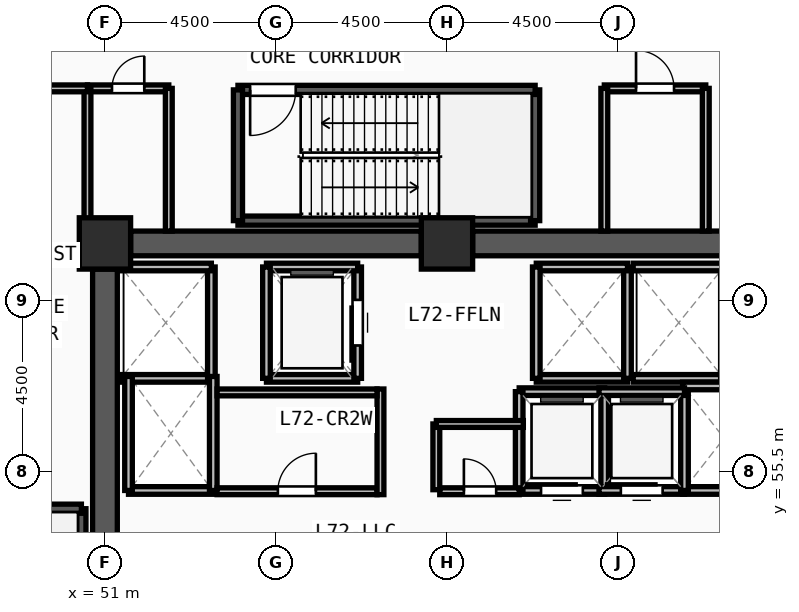
"""IFC4 building model, lengths in metres.
Left out: names, types, materials, properties, quantities, classifications, styles, units other than length and angle.
Written with IfcOpenShell. Run it as: python <this file> out.ifc"""

import sys

from ifc_helpers import new_model, si_unit, direction, frame, frame_2d, origin, origin_2d, place, context, subcontext, project, spatial, rectangle, extrude, source, transform, mapped, element, fill, save


model = new_model("IFC4")
c1 = context("Model", 3, precision=1e-05, world=origin(), true_north=direction((0.0, 1.0)))
c2 = subcontext(c1, "Body", "Model", "MODEL_VIEW")
j1 = project(units=[si_unit("LENGTHUNIT", "METRE"), si_unit("PLANEANGLEUNIT", "RADIAN")], contexts=[c1])
p1 = place(None, origin())
s1 = spatial("IfcSite", under=j1, at=p1, CompositionType="ELEMENT")
p2 = place(p1, origin())
s2 = spatial("IfcBuilding", under=s1, at=p2, CompositionType="ELEMENT")
p3 = place(p2, frame((0.0, 0.0, 277.5)))
s3 = spatial("IfcBuildingStorey", under=s2, at=p3, CompositionType="ELEMENT", Elevation=277.5)
m1 = source(origin(), c2, "Body", "SweptSolid", [
    extrude(rectangle(XDim=1.35, YDim=1.35, at=origin_2d()), origin(), (0.0, 0.0, 1.0), 4.5),
])
for number, where, z_axis, x_axis in (
    (1, (60.0, 61.5, 0.0), (0.0, 0.0, 1.0), (1.0, 0.0, 0.0)),
    (2, (51.0, 61.5, 0.0), (0.0, 0.0, 1.0), (1.0, 0.0, 0.0)),
):
    element("IfcColumn", number, at=place(p3, frame(where, z_axis=z_axis, x_axis=x_axis)), inside=s3, PredefinedType="COLUMN", context=c2, shape_type="MappedRepresentation", body=[
        mapped(m1, transform((0.0, 0.0, 0.0), x_axis=(1.0, 0.0, 0.0), y_axis=(0.0, 1.0, 0.0), z_axis=(0.0, 0.0, 1.0), scale=1.0)),
    ])
for number, where, z_axis, x_axis in (
    (3, (51.675, 61.5, 0.0), (0.0, 0.0, 1.0), (1.0, 0.0, 0.0)),
    (4, (60.675, 61.5, 0.0), (0.0, 0.0, 1.0), (1.0, 0.0, 0.0)),
):
    element("IfcWall", number, at=place(p3, frame(where, z_axis=z_axis, x_axis=x_axis)), inside=s3, PredefinedType="SHEAR", context=c2, shape_type="SweptSolid", body=[
        extrude(rectangle(XDim=7.65, YDim=0.65, at=frame_2d((3.825, 0.0))), origin(), (0.0, 0.0, 1.0), 4.22),
    ])
p4 = place(p3, frame((51.0, 47.175, 0.0), z_axis=(0.0, 0.0, 1.0), x_axis=(0.0, 1.0, 0.0)))
e5 = element("IfcWall", 5, at=p4, inside=s3, PredefinedType="SHEAR", context=c2, shape_type="SweptSolid", body=[
    extrude(rectangle(XDim=13.65, YDim=0.65, at=frame_2d((6.825, 0.0))), origin(), (0.0, 0.0, 1.0), 4.22),
])
p5 = place(p3, frame((50.38, 46.7, 0.0), z_axis=(0.0, 0.0, 1.0), x_axis=(0.0, 1.0, 0.0)))
e6 = element("IfcWall", 6, at=p5, inside=s3, PredefinedType="SOLIDWALL", context=c2, shape_type="SweptSolid", body=[
    extrude(rectangle(XDim=7.82, YDim=0.24, at=frame_2d((3.91, 0.0))), origin(), (0.0, 0.0, 1.0), 4.22),
])
p6 = place(p3, frame((50.38, 54.52, 0.0), z_axis=(0.0, 0.0, 1.0), x_axis=(-1.0, 0.0, 0.0)))
e7 = element("IfcWall", 7, at=p6, inside=s3, PredefinedType="SOLIDWALL", context=c2, shape_type="SweptSolid", body=[
    extrude(rectangle(XDim=3.44, YDim=0.24, at=frame_2d((1.72, 0.0))), origin(), (0.0, 0.0, 1.0), 4.22),
])
p7 = place(p3, frame((54.5, 62.1, 0.0), z_axis=(0.0, 0.0, 1.0), x_axis=(1.0, 0.0, 0.0)))
e8 = element("IfcWall", 8, at=p7, inside=s3, PredefinedType="SOLIDWALL", context=c2, shape_type="SweptSolid", body=[
    extrude(rectangle(XDim=7.82, YDim=0.24, at=frame_2d((3.91, 0.0))), origin(), (0.0, 0.0, 1.0), 4.22),
])
p8 = place(p3, frame((62.32, 62.1, 0.0), z_axis=(0.0, 0.0, 1.0), x_axis=(0.0, 1.0, 0.0)))
e9 = element("IfcWall", 9, at=p8, inside=s3, PredefinedType="SOLIDWALL", context=c2, shape_type="SweptSolid", body=[
    extrude(rectangle(XDim=3.44, YDim=0.24, at=frame_2d((1.72, 0.0))), origin(), (0.0, 0.0, 1.0), 4.22),
])
p9 = place(p3, frame((62.32, 65.54, 0.0), z_axis=(0.0, 0.0, 1.0), x_axis=(-1.0, 0.0, 0.0)))
e10 = element("IfcWall", 10, at=p9, inside=s3, PredefinedType="SOLIDWALL", context=c2, shape_type="SweptSolid", body=[
    extrude(rectangle(XDim=7.82, YDim=0.24, at=frame_2d((3.91, 0.0))), origin(), (0.0, 0.0, 1.0), 4.22),
])
m2 = source(origin(), c2, "Body", "SweptSolid", [
    extrude(rectangle(XDim=1.2, YDim=2.2, at=frame_2d((0.6, 1.1))), frame((0.0, 0.13, 0.0), z_axis=(0.0, -1.0, 0.0), x_axis=(1.0, 0.0, 0.0)), (0.0, 0.0, 1.0), 0.26),
])
p10 = place(p9, frame((6.3, 0.0, 0.0)))
e11 = element("IfcOpeningElement", 11, at=p10, cuts=e10, PredefinedType="OPENING", context=c2, shape_type="MappedRepresentation", body=[
    mapped(m2, transform((0.0, 0.0, 0.0), x_axis=(1.0, 0.0, 0.0), y_axis=(0.0, 1.0, 0.0), z_axis=(0.0, 0.0, 1.0), scale=1.0)),
])
p11 = place(p3, frame((54.5, 65.54, 0.0), z_axis=(0.0, 0.0, 1.0), x_axis=(0.0, -1.0, 0.0)))
e12 = element("IfcWall", 12, at=p11, inside=s3, PredefinedType="SOLIDWALL", context=c2, shape_type="SweptSolid", body=[
    extrude(rectangle(XDim=3.44, YDim=0.24, at=frame_2d((1.72, 0.0))), origin(), (0.0, 0.0, 1.0), 4.22),
])
p12 = place(p3, frame((55.25, 57.95, 0.0), z_axis=(0.0, 0.0, 1.0), x_axis=(1.0, 0.0, 0.0)))
e13 = element("IfcWall", 13, at=p12, inside=s3, PredefinedType="SOLIDWALL", context=c2, shape_type="SweptSolid", body=[
    extrude(rectangle(XDim=2.4, YDim=0.2, at=frame_2d((1.2, 0.0))), origin(), (0.0, 0.0, 1.0), 4.22),
])
p13 = place(p3, frame((57.65, 57.95, 0.0), z_axis=(0.0, 0.0, 1.0), x_axis=(0.0, 1.0, 0.0)))
e14 = element("IfcWall", 14, at=p13, inside=s3, PredefinedType="SOLIDWALL", context=c2, shape_type="SweptSolid", body=[
    extrude(rectangle(XDim=2.93, YDim=0.2, at=frame_2d((1.465, 0.0))), origin(), (0.0, 0.0, 1.0), 4.22),
])
m3 = source(origin(), c2, "Body", "SweptSolid", [
    extrude(rectangle(XDim=1.2, YDim=2.3, at=frame_2d((0.6, 1.15))), frame((0.0, 0.11, 0.0), z_axis=(0.0, -1.0, 0.0), x_axis=(1.0, 0.0, 0.0)), (0.0, 0.0, 1.0), 0.22),
])
p14 = place(p13, frame((0.865, 0.0, 0.0)))
e15 = element("IfcOpeningElement", 15, at=p14, cuts=e14, PredefinedType="OPENING", context=c2, shape_type="MappedRepresentation", body=[
    mapped(m3, transform((0.0, 0.0, 0.0), x_axis=(1.0, 0.0, 0.0), y_axis=(0.0, 1.0, 0.0), z_axis=(0.0, 0.0, 1.0), scale=1.0)),
])
p15 = place(p3, frame((57.65, 60.88, 0.0), z_axis=(0.0, 0.0, 1.0), x_axis=(-1.0, 0.0, 0.0)))
e16 = element("IfcWall", 16, at=p15, inside=s3, PredefinedType="SOLIDWALL", context=c2, shape_type="SweptSolid", body=[
    extrude(rectangle(XDim=2.4, YDim=0.2, at=frame_2d((1.2, 0.0))), origin(), (0.0, 0.0, 1.0), 4.22),
])
p16 = place(p3, frame((55.25, 60.88, 0.0), z_axis=(0.0, 0.0, 1.0), x_axis=(0.0, -1.0, 0.0)))
e17 = element("IfcWall", 17, at=p16, inside=s3, PredefinedType="SOLIDWALL", context=c2, shape_type="SweptSolid", body=[
    extrude(rectangle(XDim=2.93, YDim=0.2, at=frame_2d((1.465, 0.0))), origin(), (0.0, 0.0, 1.0), 4.22),
])
p17 = place(p3, frame((62.35, 57.95, 0.0), z_axis=(0.0, 0.0, 1.0), x_axis=(1.0, 0.0, 0.0)))
e18 = element("IfcWall", 18, at=p17, inside=s3, PredefinedType="SOLIDWALL", context=c2, shape_type="SweptSolid", body=[
    extrude(rectangle(XDim=2.4, YDim=0.2, at=frame_2d((1.2, 0.0))), origin(), (0.0, 0.0, 1.0), 4.22),
])
p18 = place(p3, frame((64.75, 57.95, 0.0), z_axis=(0.0, 0.0, 1.0), x_axis=(0.0, 1.0, 0.0)))
e19 = element("IfcWall", 19, at=p18, inside=s3, PredefinedType="SOLIDWALL", context=c2, shape_type="SweptSolid", body=[
    extrude(rectangle(XDim=2.93, YDim=0.2, at=frame_2d((1.465, 0.0))), origin(), (0.0, 0.0, 1.0), 4.22),
])
p19 = place(p3, frame((64.75, 60.88, 0.0), z_axis=(0.0, 0.0, 1.0), x_axis=(-1.0, 0.0, 0.0)))
e20 = element("IfcWall", 20, at=p19, inside=s3, PredefinedType="SOLIDWALL", context=c2, shape_type="SweptSolid", body=[
    extrude(rectangle(XDim=2.4, YDim=0.2, at=frame_2d((1.2, 0.0))), origin(), (0.0, 0.0, 1.0), 4.22),
])
p20 = place(p3, frame((62.35, 60.88, 0.0), z_axis=(0.0, 0.0, 1.0), x_axis=(0.0, -1.0, 0.0)))
e21 = element("IfcWall", 21, at=p20, inside=s3, PredefinedType="SOLIDWALL", context=c2, shape_type="SweptSolid", body=[
    extrude(rectangle(XDim=2.93, YDim=0.2, at=frame_2d((1.465, 0.0))), origin(), (0.0, 0.0, 1.0), 4.22),
])
for number, where, z_axis, x_axis in (
    (22, (64.9, 57.95, 0.0), (0.0, 0.0, 1.0), (1.0, 0.0, 0.0)),
    (23, (67.3, 60.88, 0.0), (0.0, 0.0, 1.0), (-1.0, 0.0, 0.0)),
    (24, (51.4, 57.95, 0.0), (0.0, 0.0, 1.0), (1.0, 0.0, 0.0)),
):
    element("IfcWall", number, at=place(p3, frame(where, z_axis=z_axis, x_axis=x_axis)), inside=s3, PredefinedType="SOLIDWALL", context=c2, shape_type="SweptSolid", body=[
        extrude(rectangle(XDim=2.4, YDim=0.2, at=frame_2d((1.2, 0.0))), origin(), (0.0, 0.0, 1.0), 4.22),
    ])
p21 = place(p3, frame((53.8, 57.95, 0.0), z_axis=(0.0, 0.0, 1.0), x_axis=(0.0, 1.0, 0.0)))
e25 = element("IfcWall", 25, at=p21, inside=s3, PredefinedType="SOLIDWALL", context=c2, shape_type="SweptSolid", body=[
    extrude(rectangle(XDim=2.93, YDim=0.2, at=frame_2d((1.465, 0.0))), origin(), (0.0, 0.0, 1.0), 4.22),
])
p22 = place(p3, frame((53.8, 60.88, 0.0), z_axis=(0.0, 0.0, 1.0), x_axis=(-1.0, 0.0, 0.0)))
e26 = element("IfcWall", 26, at=p22, inside=s3, PredefinedType="SOLIDWALL", context=c2, shape_type="SweptSolid", body=[
    extrude(rectangle(XDim=2.4, YDim=0.2, at=frame_2d((1.2, 0.0))), origin(), (0.0, 0.0, 1.0), 4.22),
])
p23 = place(p3, frame((51.62, 55.0, 0.0), z_axis=(0.0, 0.0, 1.0), x_axis=(1.0, 0.0, 0.0)))
e27 = element("IfcWall", 27, at=p23, inside=s3, PredefinedType="SOLIDWALL", context=c2, shape_type="SweptSolid", body=[
    extrude(rectangle(XDim=2.23, YDim=0.2, at=frame_2d((1.115, 0.0))), origin(), (0.0, 0.0, 1.0), 4.22),
])
for number, where, z_axis, x_axis in (
    (28, (53.85, 55.0, 0.0), (0.0, 0.0, 1.0), (0.0, 1.0, 0.0)),
    (29, (51.62, 58.0, 0.0), (0.0, 0.0, 1.0), (0.0, -1.0, 0.0)),
):
    element("IfcWall", number, at=place(p3, frame(where, z_axis=z_axis, x_axis=x_axis)), inside=s3, PredefinedType="SOLIDWALL", context=c2, shape_type="SweptSolid", body=[
        extrude(rectangle(XDim=3.0, YDim=0.2, at=frame_2d((1.5, 0.0))), origin(), (0.0, 0.0, 1.0), 4.22),
    ])
for number, where, z_axis, x_axis in (
    (30, (66.2, 55.0, 0.0), (0.0, 0.0, 1.0), (1.0, 0.0, 0.0)),
    (31, (68.38, 57.75, 0.0), (0.0, 0.0, 1.0), (-1.0, 0.0, 0.0)),
):
    element("IfcWall", number, at=place(p3, frame(where, z_axis=z_axis, x_axis=x_axis)), inside=s3, PredefinedType="SOLIDWALL", context=c2, shape_type="SweptSolid", body=[
        extrude(rectangle(XDim=2.18, YDim=0.2, at=frame_2d((1.09, 0.0))), origin(), (0.0, 0.0, 1.0), 4.22),
    ])
p24 = place(p3, frame((61.9, 55.0, 0.0), z_axis=(0.0, 0.0, 1.0), x_axis=(1.0, 0.0, 0.0)))
e32 = element("IfcWall", 32, at=p24, inside=s3, PredefinedType="SOLIDWALL", context=c2, shape_type="SweptSolid", body=[
    extrude(rectangle(XDim=2.25, YDim=0.2, at=frame_2d((1.125, 0.0))), origin(), (0.0, 0.0, 1.0), 4.22),
])
m4 = source(origin(), c2, "Body", "SweptSolid", [
    extrude(rectangle(XDim=1.1, YDim=2.2, at=frame_2d((0.55, 1.1))), frame((0.0, 0.11, 0.0), z_axis=(0.0, -1.0, 0.0), x_axis=(1.0, 0.0, 0.0)), (0.0, 0.0, 1.0), 0.22),
])
p25 = place(p24, frame((0.575, 0.0, 0.0)))
e33 = element("IfcOpeningElement", 33, at=p25, cuts=e32, PredefinedType="OPENING", context=c2, shape_type="MappedRepresentation", body=[
    mapped(m4, transform((0.0, 0.0, 0.0), x_axis=(1.0, 0.0, 0.0), y_axis=(0.0, 1.0, 0.0), z_axis=(0.0, 0.0, 1.0), scale=1.0)),
])
p26 = place(p3, frame((64.15, 55.0, 0.0), z_axis=(0.0, 0.0, 1.0), x_axis=(0.0, 1.0, 0.0)))
e34 = element("IfcWall", 34, at=p26, inside=s3, PredefinedType="SOLIDWALL", context=c2, shape_type="SweptSolid", body=[
    extrude(rectangle(XDim=2.6, YDim=0.2, at=frame_2d((1.3, 0.0))), origin(), (0.0, 0.0, 1.0), 4.22),
])
p27 = place(p3, frame((64.15, 57.6, 0.0), z_axis=(0.0, 0.0, 1.0), x_axis=(-1.0, 0.0, 0.0)))
e35 = element("IfcWall", 35, at=p27, inside=s3, PredefinedType="SOLIDWALL", context=c2, shape_type="SweptSolid", body=[
    extrude(rectangle(XDim=2.25, YDim=0.2, at=frame_2d((1.125, 0.0))), origin(), (0.0, 0.0, 1.0), 4.22),
])
p28 = place(p3, frame((61.9, 57.6, 0.0), z_axis=(0.0, 0.0, 1.0), x_axis=(0.0, -1.0, 0.0)))
e36 = element("IfcWall", 36, at=p28, inside=s3, PredefinedType="SOLIDWALL", context=c2, shape_type="SweptSolid", body=[
    extrude(rectangle(XDim=2.6, YDim=0.2, at=frame_2d((1.3, 0.0))), origin(), (0.0, 0.0, 1.0), 4.22),
])
p29 = place(p3, frame((64.0, 55.0, 0.0), z_axis=(0.0, 0.0, 1.0), x_axis=(1.0, 0.0, 0.0)))
e37 = element("IfcWall", 37, at=p29, inside=s3, PredefinedType="SOLIDWALL", context=c2, shape_type="SweptSolid", body=[
    extrude(rectangle(XDim=2.25, YDim=0.2, at=frame_2d((1.125, 0.0))), origin(), (0.0, 0.0, 1.0), 4.22),
])
p30 = place(p29, frame((0.575, 0.0, 0.0)))
e38 = element("IfcOpeningElement", 38, at=p30, cuts=e37, PredefinedType="OPENING", context=c2, shape_type="MappedRepresentation", body=[
    mapped(m4, transform((0.0, 0.0, 0.0), x_axis=(1.0, 0.0, 0.0), y_axis=(0.0, 1.0, 0.0), z_axis=(0.0, 0.0, 1.0), scale=1.0)),
])
p31 = place(p3, frame((66.25, 55.0, 0.0), z_axis=(0.0, 0.0, 1.0), x_axis=(0.0, 1.0, 0.0)))
e39 = element("IfcWall", 39, at=p31, inside=s3, PredefinedType="SOLIDWALL", context=c2, shape_type="SweptSolid", body=[
    extrude(rectangle(XDim=2.6, YDim=0.2, at=frame_2d((1.3, 0.0))), origin(), (0.0, 0.0, 1.0), 4.22),
])
p32 = place(p3, frame((66.25, 57.6, 0.0), z_axis=(0.0, 0.0, 1.0), x_axis=(-1.0, 0.0, 0.0)))
e40 = element("IfcWall", 40, at=p32, inside=s3, PredefinedType="SOLIDWALL", context=c2, shape_type="SweptSolid", body=[
    extrude(rectangle(XDim=2.25, YDim=0.2, at=frame_2d((1.125, 0.0))), origin(), (0.0, 0.0, 1.0), 4.22),
])
p33 = place(p3, frame((53.95, 54.98, 0.0), z_axis=(0.0, 0.0, 1.0), x_axis=(1.0, 0.0, 0.0)))
e41 = element("IfcWall", 41, at=p33, inside=s3, PredefinedType="PARTITIONING", context=c2, shape_type="SweptSolid", body=[
    extrude(rectangle(XDim=4.21, YDim=0.18, at=frame_2d((2.105, 0.0))), origin(), (0.0, 0.0, 1.0), 4.22),
])
m5 = source(origin(), c2, "Body", "SweptSolid", [
    extrude(rectangle(XDim=1.0, YDim=2.2, at=frame_2d((0.5, 1.1))), frame((0.0, 0.1, 0.0), z_axis=(0.0, -1.0, 0.0), x_axis=(1.0, 0.0, 0.0)), (0.0, 0.0, 1.0), 0.2),
])
p34 = place(p33, frame((1.6, 0.0, 0.0)))
e42 = element("IfcOpeningElement", 42, at=p34, cuts=e41, PredefinedType="OPENING", context=c2, shape_type="MappedRepresentation", body=[
    mapped(m5, transform((0.0, 0.0, 0.0), x_axis=(1.0, 0.0, 0.0), y_axis=(0.0, 1.0, 0.0), z_axis=(0.0, 0.0, 1.0), scale=1.0)),
])
p35 = place(p3, frame((59.81, 54.98, 0.0), z_axis=(0.0, 0.0, 1.0), x_axis=(1.0, 0.0, 0.0)))
e43 = element("IfcWall", 43, at=p35, inside=s3, PredefinedType="PARTITIONING", context=c2, shape_type="SweptSolid", body=[
    extrude(rectangle(XDim=2.09, YDim=0.18, at=frame_2d((1.045, 0.0))), origin(), (0.0, 0.0, 1.0), 4.22),
])
m6 = source(origin(), c2, "Body", "SweptSolid", [
    extrude(rectangle(XDim=0.85, YDim=2.1, at=frame_2d((0.425, 1.05))), frame((0.0, 0.1, 0.0), z_axis=(0.0, -1.0, 0.0), x_axis=(1.0, 0.0, 0.0)), (0.0, 0.0, 1.0), 0.2),
])
p36 = place(p35, frame((0.635, 0.0, 0.0)))
e44 = element("IfcOpeningElement", 44, at=p36, cuts=e43, PredefinedType="OPENING", context=c2, shape_type="MappedRepresentation", body=[
    mapped(m6, transform((0.0, 0.0, 0.0), x_axis=(1.0, 0.0, 0.0), y_axis=(0.0, 1.0, 0.0), z_axis=(0.0, 0.0, 1.0), scale=1.0)),
])
p37 = place(p3, frame((50.54, 65.58, 0.0), z_axis=(0.0, 0.0, 1.0), x_axis=(1.0, 0.0, 0.0)))
e45 = element("IfcWall", 45, at=p37, inside=s3, PredefinedType="PARTITIONING", context=c2, shape_type="SweptSolid", body=[
    extrude(rectangle(XDim=2.14, YDim=0.18, at=frame_2d((1.07, 0.0))), origin(), (0.0, 0.0, 1.0), 4.22),
])
p38 = place(p37, frame((0.645, 0.0, 0.0)))
e46 = element("IfcOpeningElement", 46, at=p38, cuts=e45, PredefinedType="OPENING", context=c2, shape_type="MappedRepresentation", body=[
    mapped(m6, transform((0.0, 0.0, 0.0), x_axis=(1.0, 0.0, 0.0), y_axis=(0.0, 1.0, 0.0), z_axis=(0.0, 0.0, 1.0), scale=1.0)),
])
p39 = place(p3, frame((64.14, 65.58, 0.0), z_axis=(0.0, 0.0, 1.0), x_axis=(1.0, 0.0, 0.0)))
e47 = element("IfcWall", 47, at=p39, inside=s3, PredefinedType="PARTITIONING", context=c2, shape_type="SweptSolid", body=[
    extrude(rectangle(XDim=2.67, YDim=0.18, at=frame_2d((1.335, 0.0))), origin(), (0.0, 0.0, 1.0), 4.22),
])
p40 = place(p39, frame((0.835, 0.0, 0.0)))
e48 = element("IfcOpeningElement", 48, at=p40, cuts=e47, PredefinedType="OPENING", context=c2, shape_type="MappedRepresentation", body=[
    mapped(m5, transform((0.0, 0.0, 0.0), x_axis=(1.0, 0.0, 0.0), y_axis=(0.0, 1.0, 0.0), z_axis=(0.0, 0.0, 1.0), scale=1.0)),
])
p41 = place(p3, frame((59.72, 55.02, 0.0), z_axis=(0.0, 0.0, 1.0), x_axis=(0.0, 1.0, 0.0)))
e49 = element("IfcWall", 49, at=p41, inside=s3, PredefinedType="PARTITIONING", context=c2, shape_type="SweptSolid", body=[
    extrude(rectangle(XDim=1.73, YDim=0.18, at=frame_2d((0.865, 0.0))), origin(), (0.0, 0.0, 1.0), 4.22),
])
p42 = place(p3, frame((59.72, 56.75, 0.0), z_axis=(0.0, 0.0, 1.0), x_axis=(1.0, 0.0, 0.0)))
e50 = element("IfcWall", 50, at=p42, inside=s3, PredefinedType="PARTITIONING", context=c2, shape_type="SweptSolid", body=[
    extrude(rectangle(XDim=2.29, YDim=0.18, at=frame_2d((1.145, 0.0))), origin(), (0.0, 0.0, 1.0), 4.22),
])
p43 = place(p3, frame((50.54, 61.95, 0.0), z_axis=(0.0, 0.0, 1.0), x_axis=(0.0, 1.0, 0.0)))
e51 = element("IfcWall", 51, at=p43, inside=s3, PredefinedType="PARTITIONING", context=c2, shape_type="SweptSolid", body=[
    extrude(rectangle(XDim=3.63, YDim=0.18, at=frame_2d((1.815, 0.0))), origin(), (0.0, 0.0, 1.0), 4.22),
])
for number, where, z_axis, x_axis in (
    (52, (52.68, 61.825, 0.0), (0.0, 0.0, 1.0), (0.0, 1.0, 0.0)),
    (53, (64.14, 61.825, 0.0), (0.0, 0.0, 1.0), (0.0, 1.0, 0.0)),
    (54, (66.81, 61.825, 0.0), (0.0, 0.0, 1.0), (0.0, 1.0, 0.0)),
):
    element("IfcWall", number, at=place(p3, frame(where, z_axis=z_axis, x_axis=x_axis)), inside=s3, PredefinedType="PARTITIONING", context=c2, shape_type="SweptSolid", body=[
        extrude(rectangle(XDim=3.755, YDim=0.18, at=frame_2d((1.877, 0.0))), origin(), (0.0, 0.0, 1.0), 4.22),
    ])
p44 = place(p3, frame((46.7, 65.58, 0.0), z_axis=(0.0, 0.0, 1.0), x_axis=(1.0, 0.0, 0.0)))
e55 = element("IfcWall", 55, at=p44, inside=s3, PredefinedType="PARTITIONING", context=c2, shape_type="SweptSolid", body=[
    extrude(rectangle(XDim=3.84, YDim=0.18, at=frame_2d((1.92, 0.0))), origin(), (0.0, 0.0, 1.0), 4.22),
])
p45 = place(p3, frame((58.25, 54.89, 0.0), z_axis=(0.0, 0.0, 1.0), x_axis=(0.0, 1.0, 0.0)))
e56 = element("IfcWall", 56, at=p45, inside=s3, PredefinedType="PARTITIONING", context=c2, shape_type="SweptSolid", body=[
    extrude(rectangle(XDim=2.78, YDim=0.18, at=frame_2d((1.39, 0.0))), origin(), (0.0, 0.0, 1.0), 4.22),
])
p46 = place(p3, frame((53.95, 57.58, 0.0), z_axis=(0.0, 0.0, 1.0), x_axis=(1.0, 0.0, 0.0)))
e57 = element("IfcWall", 57, at=p46, inside=s3, PredefinedType="PARTITIONING", context=c2, shape_type="SweptSolid", body=[
    extrude(rectangle(XDim=4.21, YDim=0.18, at=frame_2d((2.105, 0.0))), origin(), (0.0, 0.0, 1.0), 4.22),
])
m7 = source(origin(), c2, "Body", "SweptSolid", [
    extrude(rectangle(XDim=1.2, YDim=2.2, at=frame_2d((0.6, 1.1))), frame((0.0, 0.025, 0.0), z_axis=(0.0, -1.0, 0.0), x_axis=(1.0, 0.0, 0.0)), (0.0, 0.0, 1.0), 0.05),
])
p47 = place(p10, origin())
e58 = element("IfcDoor", 58, at=p47, inside=s3, OperationType="SINGLE_SWING_RIGHT", PredefinedType="DOOR", context=c2, shape_type="MappedRepresentation", body=[
    mapped(m7, transform((0.0, 0.0, 0.0), x_axis=(1.0, 0.0, 0.0), y_axis=(0.0, 1.0, 0.0), z_axis=(0.0, 0.0, 1.0), scale=1.0)),
])
fill(e11, e58)
m8 = source(origin(), c2, "Body", "SweptSolid", [
    extrude(rectangle(XDim=1.2, YDim=2.3, at=frame_2d((0.6, 1.15))), frame((0.0, 0.025, 0.0), z_axis=(0.0, -1.0, 0.0), x_axis=(1.0, 0.0, 0.0)), (0.0, 0.0, 1.0), 0.05),
])
p48 = place(p14, origin())
e59 = element("IfcDoor", 59, at=p48, inside=s3, OperationType="SLIDING_TO_LEFT", PredefinedType="DOOR", context=c2, shape_type="MappedRepresentation", body=[
    mapped(m8, transform((0.0, 0.0, 0.0), x_axis=(1.0, 0.0, 0.0), y_axis=(0.0, 1.0, 0.0), z_axis=(0.0, 0.0, 1.0), scale=1.0)),
])
fill(e15, e59)
m9 = source(origin(), c2, "Body", "SweptSolid", [
    extrude(rectangle(XDim=1.1, YDim=2.2, at=frame_2d((0.55, 1.1))), frame((0.0, 0.025, 0.0), z_axis=(0.0, -1.0, 0.0), x_axis=(1.0, 0.0, 0.0)), (0.0, 0.0, 1.0), 0.05),
])
p49 = place(p25, origin())
e60 = element("IfcDoor", 60, at=p49, inside=s3, OperationType="SLIDING_TO_LEFT", PredefinedType="DOOR", context=c2, shape_type="MappedRepresentation", body=[
    mapped(m9, transform((0.0, 0.0, 0.0), x_axis=(1.0, 0.0, 0.0), y_axis=(0.0, 1.0, 0.0), z_axis=(0.0, 0.0, 1.0), scale=1.0)),
])
fill(e33, e60)
p50 = place(p30, origin())
e61 = element("IfcDoor", 61, at=p50, inside=s3, OperationType="SLIDING_TO_LEFT", PredefinedType="DOOR", context=c2, shape_type="MappedRepresentation", body=[
    mapped(m9, transform((0.0, 0.0, 0.0), x_axis=(1.0, 0.0, 0.0), y_axis=(0.0, 1.0, 0.0), z_axis=(0.0, 0.0, 1.0), scale=1.0)),
])
fill(e38, e61)
m10 = source(origin(), c2, "Body", "SweptSolid", [
    extrude(rectangle(XDim=1.0, YDim=2.2, at=frame_2d((0.5, 1.1))), frame((0.0, 0.025, 0.0), z_axis=(0.0, -1.0, 0.0), x_axis=(1.0, 0.0, 0.0)), (0.0, 0.0, 1.0), 0.05),
])
p51 = place(p34, origin())
e62 = element("IfcDoor", 62, at=p51, inside=s3, OperationType="SINGLE_SWING_RIGHT", PredefinedType="DOOR", context=c2, shape_type="MappedRepresentation", body=[
    mapped(m10, transform((0.0, 0.0, 0.0), x_axis=(1.0, 0.0, 0.0), y_axis=(0.0, 1.0, 0.0), z_axis=(0.0, 0.0, 1.0), scale=1.0)),
])
fill(e42, e62)
m11 = source(origin(), c2, "Body", "SweptSolid", [
    extrude(rectangle(XDim=0.85, YDim=2.1, at=frame_2d((0.425, 1.05))), frame((0.0, 0.025, 0.0), z_axis=(0.0, -1.0, 0.0), x_axis=(1.0, 0.0, 0.0)), (0.0, 0.0, 1.0), 0.05),
])
p52 = place(p36, origin())
e63 = element("IfcDoor", 63, at=p52, inside=s3, OperationType="SINGLE_SWING_LEFT", PredefinedType="DOOR", context=c2, shape_type="MappedRepresentation", body=[
    mapped(m11, transform((0.0, 0.0, 0.0), x_axis=(1.0, 0.0, 0.0), y_axis=(0.0, 1.0, 0.0), z_axis=(0.0, 0.0, 1.0), scale=1.0)),
])
fill(e44, e63)
p53 = place(p38, origin())
e64 = element("IfcDoor", 64, at=p53, inside=s3, OperationType="SINGLE_SWING_RIGHT", PredefinedType="DOOR", context=c2, shape_type="MappedRepresentation", body=[
    mapped(m11, transform((0.0, 0.0, 0.0), x_axis=(1.0, 0.0, 0.0), y_axis=(0.0, 1.0, 0.0), z_axis=(0.0, 0.0, 1.0), scale=1.0)),
])
fill(e46, e64)
p54 = place(p40, origin())
e65 = element("IfcDoor", 65, at=p54, inside=s3, OperationType="SINGLE_SWING_LEFT", PredefinedType="DOOR", context=c2, shape_type="MappedRepresentation", body=[
    mapped(m10, transform((0.0, 0.0, 0.0), x_axis=(1.0, 0.0, 0.0), y_axis=(0.0, 1.0, 0.0), z_axis=(0.0, 0.0, 1.0), scale=1.0)),
])
fill(e48, e65)
save(model, sys.argv[1])
